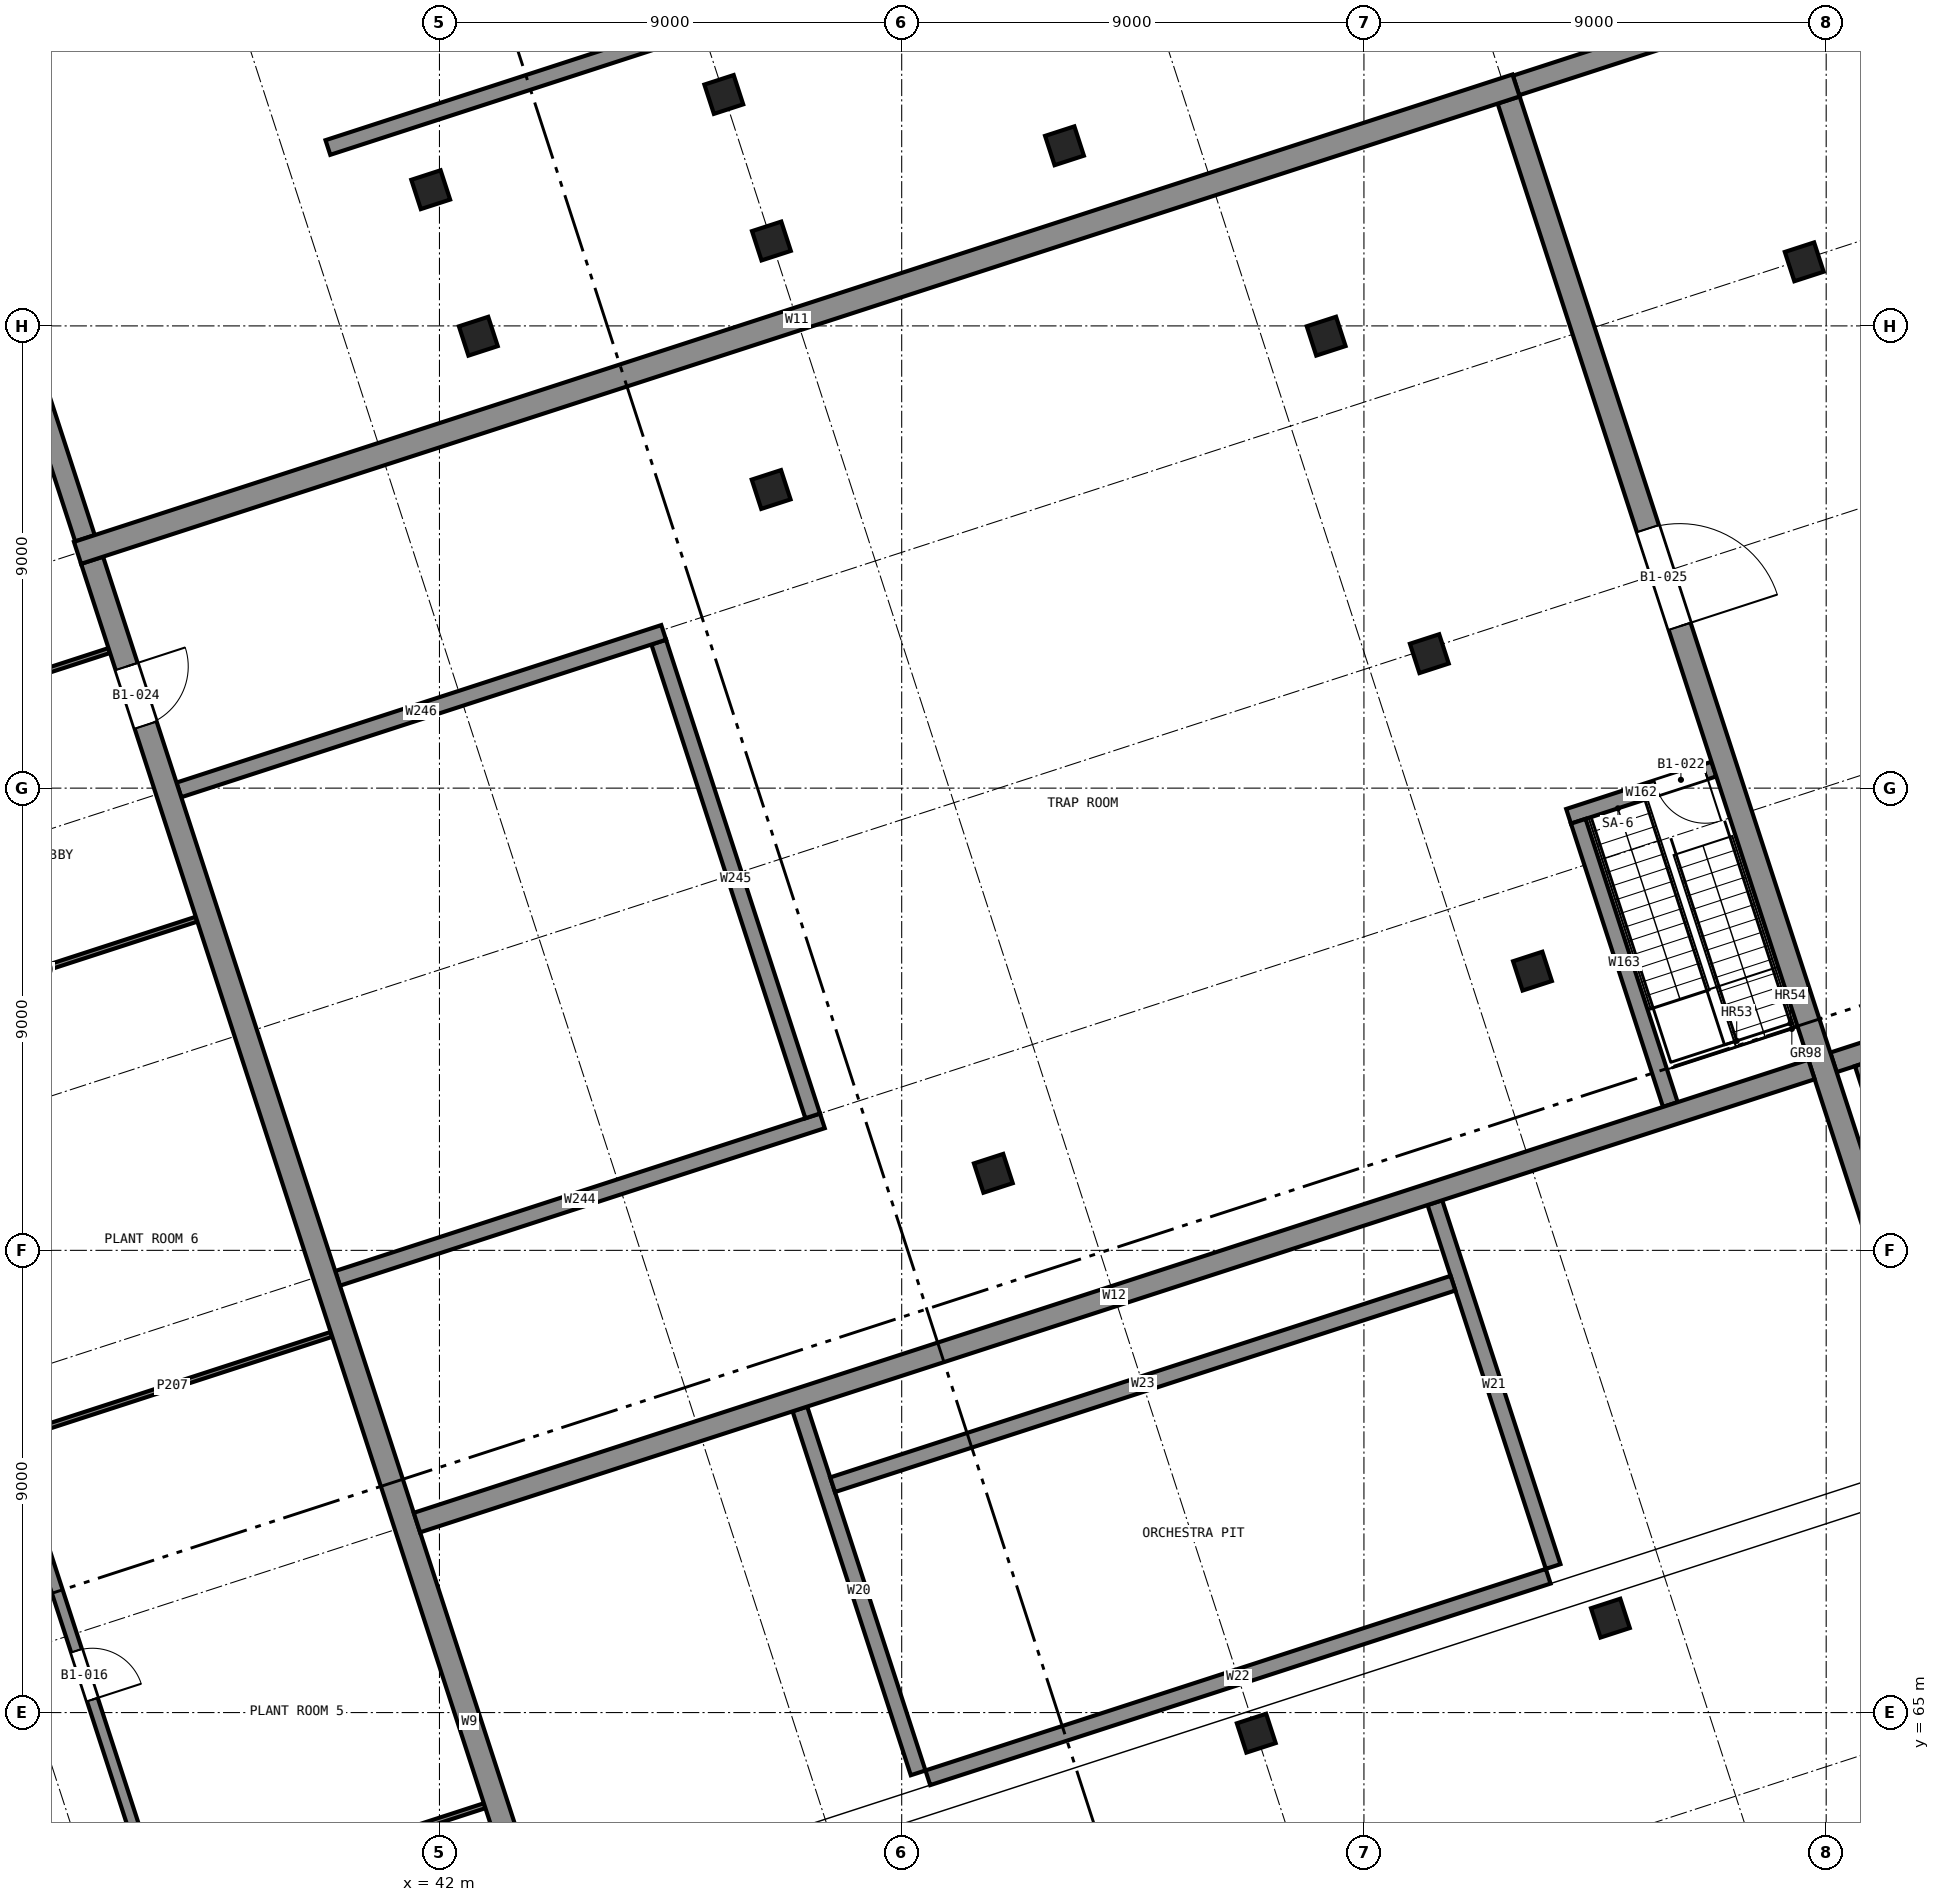
"""IFC4 building model, lengths in metres.
Left out: names, types, materials, properties, quantities, classifications, styles, units other than length and angle.
Written with IfcOpenShell. Run it as: python <this file> out.ifc"""

import sys

from ifc_helpers import new_model, si_unit, direction, frame, frame_2d, origin, origin_2d, place, context, subcontext, project, spatial, rectangle, extrude, element, fill, save


model = new_model("IFC4")
c1 = context("Model", 3, precision=1e-05, world=origin(), true_north=direction((0.0, 1.0)))
c2 = subcontext(c1, "Body", "Model", "MODEL_VIEW")
j1 = project(units=[si_unit("LENGTHUNIT", "METRE"), si_unit("PLANEANGLEUNIT", "RADIAN")], contexts=[c1])
p1 = place(None, origin())
s1 = spatial("IfcSite", under=j1, at=p1, CompositionType="ELEMENT")
p2 = place(p1, origin())
s2 = spatial("IfcBuilding", under=s1, at=p2, CompositionType="ELEMENT")
p3 = place(p2, frame((0.0, 0.0, -5.0)))
s3 = spatial("IfcBuildingStorey", under=s2, at=p3, CompositionType="ELEMENT", Elevation=-5.0)
p4 = place(p3, frame((49.93, 42.214, 0.0), z_axis=(0.0, 0.0, 1.0), x_axis=(-0.309013046462, 0.951057799041, 0.0)))
e1 = element("IfcWall", 1, at=p4, inside=s3, PredefinedType="SHEAR", context=c2, shape_type="SweptSolid", body=[
    extrude(rectangle(XDim=47.55, YDim=0.45, at=frame_2d((23.775, 0.0))), origin(), (0.0, 0.0, 1.0), 5.0),
])
p5 = place(p4, frame((11.775, 0.0, 0.0)))
e2 = element("IfcOpeningElement", 2, at=p5, cuts=e1, PredefinedType="OPENING", context=c2, shape_type="SweptSolid", body=[
    extrude(rectangle(XDim=1.2, YDim=2.1, at=frame_2d((0.6, 1.05))), frame((0.0, 0.235, 0.0), z_axis=(0.0, -1.0, 0.0), x_axis=(1.0, 0.0, 0.0)), (0.0, 0.0, 1.0), 0.47),
])
p6 = place(p4, frame((44.175, 0.0, 0.0)))
e3 = element("IfcOpeningElement", 3, at=p6, cuts=e1, PredefinedType="OPENING", context=c2, shape_type="SweptSolid", body=[
    extrude(rectangle(XDim=1.2, YDim=2.1, at=frame_2d((0.6, 1.05))), frame((0.0, 0.235, 0.0), z_axis=(0.0, -1.0, 0.0), x_axis=(1.0, 0.0, 0.0)), (0.0, 0.0, 1.0), 0.47),
])
p7 = place(p3, frame((77.511, 51.176, 0.0), z_axis=(0.0, 0.0, 1.0), x_axis=(-0.309019199525, 0.951055799796, 0.0)))
e4 = element("IfcWall", 4, at=p7, inside=s3, PredefinedType="SHEAR", context=c2, shape_type="SweptSolid", body=[
    extrude(rectangle(XDim=47.55, YDim=0.45, at=frame_2d((23.775, 0.0))), origin(), (0.0, 0.0, 1.0), 5.0),
])
p8 = place(p7, frame((36.775, 0.0, 0.0)))
e5 = element("IfcOpeningElement", 5, at=p8, cuts=e4, PredefinedType="OPENING", context=c2, shape_type="SweptSolid", body=[
    extrude(rectangle(XDim=2.0, YDim=2.4, at=frame_2d((1.0, 1.2))), frame((0.0, 0.235, 0.0), z_axis=(0.0, -1.0, 0.0), x_axis=(1.0, 0.0, 0.0)), (0.0, 0.0, 1.0), 0.47),
])
p9 = place(p3, frame((34.953, 87.581, 0.0), z_axis=(0.0, 0.0, 1.0), x_axis=(0.951059165148, 0.309008841924, 0.0)))
e6 = element("IfcWall", 6, at=p9, inside=s3, PredefinedType="SHEAR", context=c2, shape_type="SweptSolid", body=[
    extrude(rectangle(XDim=29.45, YDim=0.45, at=frame_2d((14.725, 0.0))), origin(), (0.0, 0.0, 1.0), 5.0),
])
p10 = place(p3, frame((41.562, 68.699, 0.0), z_axis=(0.0, 0.0, 1.0), x_axis=(0.951058008754, 0.309012401021, 0.0)))
e7 = element("IfcWall", 7, at=p10, inside=s3, PredefinedType="SHEAR", context=c2, shape_type="SweptSolid", body=[
    extrude(rectangle(XDim=28.55, YDim=0.4, at=frame_2d((14.275, 0.0))), origin(), (0.0, 0.0, 1.0), 5.0),
])
p11 = place(p3, frame((32.139, 96.971, 0.0), z_axis=(0.0, 0.0, 1.0), x_axis=(0.30901284874, -0.951057863284, 0.0)))
e8 = element("IfcWall", 8, at=p11, inside=s3, PredefinedType="SOLIDWALL", context=c2, shape_type="SweptSolid", body=[
    extrude(rectangle(XDim=9.575, YDim=0.4, at=frame_2d((4.787, 0.0))), origin(), (0.0, 0.0, 1.0), 5.0),
])
p12 = place(p3, frame((69.142, 77.661, 0.0), z_axis=(0.0, 0.0, 1.0), x_axis=(0.951057854068, 0.309012877105, 0.0)))
e9 = element("IfcWall", 9, at=p12, inside=s3, PredefinedType="SOLIDWALL", context=c2, shape_type="SweptSolid", body=[
    extrude(rectangle(XDim=8.975, YDim=0.4, at=frame_2d((4.488, 0.0))), origin(), (0.0, 0.0, 1.0), 5.0),
])
p13 = place(p3, frame((71.498, 99.455, 0.0), z_axis=(0.0, 0.0, 1.0), x_axis=(-0.951055256492, -0.309020871625, 0.0)))
e10 = element("IfcWall", 10, at=p13, inside=s3, PredefinedType="SOLIDWALL", context=c2, shape_type="SweptSolid", body=[
    extrude(rectangle(XDim=8.975, YDim=0.4, at=frame_2d((4.487, 0.0))), origin(), (0.0, 0.0, 1.0), 5.0),
])
p14 = place(p3, frame((51.32, 63.826, 0.0), z_axis=(0.0, 0.0, 1.0), x_axis=(-0.309022346796, 0.951054777171, 0.0)))
e11 = element("IfcWall", 11, at=p14, inside=s3, PredefinedType="SOLIDWALL", context=c2, shape_type="SweptSolid", body=[
    extrude(rectangle(XDim=7.45, YDim=0.3, at=frame_2d((3.725, 0.0))), origin(), (0.0, 0.0, 1.0), 5.0),
])
p15 = place(p3, frame((63.684, 67.843, 0.0), z_axis=(0.0, 0.0, 1.0), x_axis=(-0.308992705592, 0.951064407856, 0.0)))
e12 = element("IfcWall", 12, at=p15, inside=s3, PredefinedType="SOLIDWALL", context=c2, shape_type="SweptSolid", body=[
    extrude(rectangle(XDim=7.45, YDim=0.3, at=frame_2d((3.725, 0.0))), origin(), (0.0, 0.0, 1.0), 5.0),
])
p16 = place(p3, frame((51.509, 63.73, 0.0), z_axis=(0.0, 0.0, 1.0), x_axis=(0.951055115902, 0.30902130431, 0.0)))
e13 = element("IfcWall", 13, at=p16, inside=s3, PredefinedType="SOLIDWALL", context=c2, shape_type="SweptSolid", body=[
    extrude(rectangle(XDim=12.7, YDim=0.3, at=frame_2d((6.35, 0.0))), origin(), (0.0, 0.0, 1.0), 5.0),
])
p17 = place(p3, frame((49.655, 69.436, 0.0), z_axis=(0.0, 0.0, 1.0), x_axis=(0.951062601064, 0.308998266756, 0.0)))
e14 = element("IfcWall", 14, at=p17, inside=s3, PredefinedType="SOLIDWALL", context=c2, shape_type="SweptSolid", body=[
    extrude(rectangle(XDim=12.7, YDim=0.3, at=frame_2d((6.35, 0.0))), origin(), (0.0, 0.0, 1.0), 4.7),
])
p18 = place(p3, frame((66.814, 83.371, 0.0), z_axis=(0.0, 0.0, 1.0), x_axis=(-0.951044320459, -0.30905452678, 0.0)))
e15 = element("IfcWall", 15, at=p18, inside=s3, PredefinedType="SOLIDWALL", context=c2, shape_type="SweptSolid", body=[
    extrude(rectangle(XDim=2.975, YDim=0.3, at=frame_2d((1.488, 0.0))), origin(), (0.0, 0.0, 1.0), 4.6),
])
p19 = place(p18, frame((0.175, 0.0, 0.0)))
e16 = element("IfcOpeningElement", 16, at=p19, cuts=e15, PredefinedType="OPENING", context=c2, shape_type="SweptSolid", body=[
    extrude(rectangle(XDim=1.0, YDim=2.1, at=frame_2d((0.5, 1.05))), frame((0.0, 0.16, 0.0), z_axis=(0.0, -1.0, 0.0), x_axis=(1.0, 0.0, 0.0)), (0.0, 0.0, 1.0), 0.32),
])
p20 = place(p3, frame((64.173, 82.355, 0.0), z_axis=(0.0, 0.0, 1.0), x_axis=(0.309008023519, -0.951059431056, 0.0)))
e17 = element("IfcWall", 17, at=p20, inside=s3, PredefinedType="SOLIDWALL", context=c2, shape_type="SweptSolid", body=[
    extrude(rectangle(XDim=5.8, YDim=0.3, at=frame_2d((2.9, 0.0))), origin(), (0.0, 0.0, 1.0), 4.6),
])
p21 = place(p3, frame((40.016, 73.454, 0.0), z_axis=(0.0, 0.0, 1.0), x_axis=(0.951051963279, 0.309031006768, 0.0)))
e18 = element("IfcWall", 18, at=p21, inside=s3, PredefinedType="SOLIDWALL", context=c2, shape_type="SweptSolid", body=[
    extrude(rectangle(XDim=9.925, YDim=0.3, at=frame_2d((4.962, 0.0))), origin(), (0.0, 0.0, 1.0), 4.6),
])
p22 = place(p3, frame((49.267, 76.618, 0.0), z_axis=(0.0, 0.0, 1.0), x_axis=(-0.309000135, 0.951061994073, 0.0)))
e19 = element("IfcWall", 19, at=p22, inside=s3, PredefinedType="SOLIDWALL", context=c2, shape_type="SweptSolid", body=[
    extrude(rectangle(XDim=9.7, YDim=0.3, at=frame_2d((4.85, 0.0))), origin(), (0.0, 0.0, 1.0), 4.6),
])
p23 = place(p3, frame((46.365, 86.032, 0.0), z_axis=(0.0, 0.0, 1.0), x_axis=(-0.951051963279, -0.309031006768, 0.0)))
e20 = element("IfcWall", 20, at=p23, inside=s3, PredefinedType="SOLIDWALL", context=c2, shape_type="SweptSolid", body=[
    extrude(rectangle(XDim=9.925, YDim=0.3, at=frame_2d((4.962, 0.0))), origin(), (0.0, 0.0, 1.0), 4.6),
])
for number, where, z_axis, x_axis in (
    (21, (61.273, 85.618, 0.0), (0.0, 0.0, 1.0), (0.951, 0.309, 0.0)),
    (22, (63.281, 79.437, 0.0), (0.0, 0.0, 1.0), (0.951, 0.309, 0.0)),
    (23, (59.264, 91.8, 0.0), (0.0, 0.0, 1.0), (0.951, 0.309, 0.0)),
    (24, (52.784, 75.5, 0.0), (0.0, 0.0, 1.0), (0.951, 0.309, 0.0)),
    (25, (48.458, 88.815, 0.0), (0.0, 0.0, 1.0), (0.951, 0.309, 0.0)),
    (26, (68.573, 93.248, 0.0), (0.0, 0.0, 1.0), (0.951, 0.309, 0.0)),
    (27, (42.757, 91.799, 0.0), (0.0, 0.0, 1.0), (0.951, 0.309, 0.0)),
    (28, (48.463, 93.653, 0.0), (0.0, 0.0, 1.0), (0.951, 0.309, 0.0)),
    (29, (54.169, 95.507, 0.0), (0.0, 0.0, 1.0), (0.951, 0.309, 0.0)),
    (30, (41.83, 94.652, 0.0), (0.0, 0.0, 1.0), (0.951, 0.309, 0.0)),
    (31, (47.536, 96.506, 0.0), (0.0, 0.0, 1.0), (0.951, 0.309, 0.0)),
):
    element("IfcColumn", number, at=place(p3, frame(where, z_axis=z_axis, x_axis=x_axis)), inside=s3, PredefinedType="COLUMN", context=c2, shape_type="SweptSolid", body=[
        extrude(rectangle(XDim=0.6, YDim=0.6, at=origin_2d()), origin(), (0.0, 0.0, 1.0), 4.6),
    ])
for number, where, z_axis, x_axis in (
    (32, (57.904, 64.598, 0.0), (0.0, 0.0, 1.0), (0.951, 0.309, 0.0)),
    (33, (64.799, 66.839, 0.0), (0.0, 0.0, 1.0), (0.951, 0.309, 0.0)),
):
    element("IfcColumn", number, at=place(p3, frame(where, z_axis=z_axis, x_axis=x_axis)), inside=s3, PredefinedType="COLUMN", context=c2, shape_type="SweptSolid", body=[
        extrude(rectangle(XDim=0.6, YDim=0.6, at=origin_2d()), origin(), (0.0, 0.0, 1.0), 2.845),
    ])
p24 = place(p3, frame((72.47, 69.279, 0.0), z_axis=(0.0, 0.0, 1.0), x_axis=(-0.309035885645, 0.951050377942, 0.0)))
e34 = element("IfcWall", 34, at=p24, inside=s3, PredefinedType="SHEAR", context=c2, shape_type="SweptSolid", body=[
    extrude(rectangle(XDim=8.8, YDim=0.4, at=frame_2d((4.4, 0.0))), origin(), (0.0, 0.0, 1.0), 4.65),
])
p25 = place(p3, frame((37.956, 48.812, 0.0), z_axis=(0.0, 0.0, 1.0), x_axis=(-0.30901736393, 0.951056396219, 0.0)))
e35 = element("IfcWall", 35, at=p25, inside=s3, PredefinedType="SOLIDWALL", context=c2, shape_type="SweptSolid", body=[
    extrude(rectangle(XDim=41.7, YDim=0.22, at=frame_2d((20.85, 0.0))), origin(), (0.0, 0.0, 1.0), 4.6),
])
p26 = place(p25, frame((2.009, 0.0, 0.0)))
e36 = element("IfcOpeningElement", 36, at=p26, cuts=e35, PredefinedType="OPENING", context=c2, shape_type="SweptSolid", body=[
    extrude(rectangle(XDim=1.0, YDim=2.1, at=frame_2d((0.5, 1.05))), frame((0.0, 0.12, 0.0), z_axis=(0.0, -1.0, 0.0), x_axis=(1.0, 0.0, 0.0)), (0.0, 0.0, 1.0), 0.24),
])
p27 = place(p25, frame((11.495, 0.0, 0.0)))
e37 = element("IfcOpeningElement", 37, at=p27, cuts=e35, PredefinedType="OPENING", context=c2, shape_type="SweptSolid", body=[
    extrude(rectangle(XDim=1.0, YDim=2.1, at=frame_2d((0.5, 1.05))), frame((0.0, 0.12, 0.0), z_axis=(0.0, -1.0, 0.0), x_axis=(1.0, 0.0, 0.0)), (0.0, 0.0, 1.0), 0.24),
])
p28 = place(p25, frame((24.3, 0.0, 0.0)))
e38 = element("IfcOpeningElement", 38, at=p28, cuts=e35, PredefinedType="OPENING", context=c2, shape_type="SweptSolid", body=[
    extrude(rectangle(XDim=1.0, YDim=2.1, at=frame_2d((0.5, 1.05))), frame((0.0, 0.12, 0.0), z_axis=(0.0, -1.0, 0.0), x_axis=(1.0, 0.0, 0.0)), (0.0, 0.0, 1.0), 0.24),
])
p29 = place(p25, frame((35.045, 0.0, 0.0)))
e39 = element("IfcOpeningElement", 39, at=p29, cuts=e35, PredefinedType="OPENING", context=c2, shape_type="SweptSolid", body=[
    extrude(rectangle(XDim=1.0, YDim=2.1, at=frame_2d((0.5, 1.05))), frame((0.0, 0.12, 0.0), z_axis=(0.0, -1.0, 0.0), x_axis=(1.0, 0.0, 0.0)), (0.0, 0.0, 1.0), 0.24),
])
p30 = place(p3, frame((40.333, 49.584, 0.0), z_axis=(0.0, 0.0, 1.0), x_axis=(-0.309015643281, 0.951056955291, 0.0)))
e40 = element("IfcWall", 40, at=p30, inside=s3, PredefinedType="SOLIDWALL", context=c2, shape_type="SweptSolid", body=[
    extrude(rectangle(XDim=41.7, YDim=0.22, at=frame_2d((20.85, 0.0))), origin(), (0.0, 0.0, 1.0), 4.6),
])
p31 = place(p30, frame((2.0, 0.0, 0.0)))
e41 = element("IfcOpeningElement", 41, at=p31, cuts=e40, PredefinedType="OPENING", context=c2, shape_type="SweptSolid", body=[
    extrude(rectangle(XDim=1.0, YDim=2.1, at=frame_2d((0.5, 1.05))), frame((0.0, 0.12, 0.0), z_axis=(0.0, -1.0, 0.0), x_axis=(1.0, 0.0, 0.0)), (0.0, 0.0, 1.0), 0.24),
])
p32 = place(p30, frame((8.285, 0.0, 0.0)))
e42 = element("IfcOpeningElement", 42, at=p32, cuts=e40, PredefinedType="OPENING", context=c2, shape_type="SweptSolid", body=[
    extrude(rectangle(XDim=1.0, YDim=2.1, at=frame_2d((0.5, 1.05))), frame((0.0, 0.12, 0.0), z_axis=(0.0, -1.0, 0.0), x_axis=(1.0, 0.0, 0.0)), (0.0, 0.0, 1.0), 0.24),
])
p33 = place(p30, frame((16.475, 0.0, 0.0)))
e43 = element("IfcOpeningElement", 43, at=p33, cuts=e40, PredefinedType="OPENING", context=c2, shape_type="SweptSolid", body=[
    extrude(rectangle(XDim=1.0, YDim=2.1, at=frame_2d((0.5, 1.05))), frame((0.0, 0.12, 0.0), z_axis=(0.0, -1.0, 0.0), x_axis=(1.0, 0.0, 0.0)), (0.0, 0.0, 1.0), 0.24),
])
p34 = place(p30, frame((25.752, 0.0, 0.0)))
e44 = element("IfcOpeningElement", 44, at=p34, cuts=e40, PredefinedType="OPENING", context=c2, shape_type="SweptSolid", body=[
    extrude(rectangle(XDim=1.0, YDim=2.1, at=frame_2d((0.5, 1.05))), frame((0.0, 0.12, 0.0), z_axis=(0.0, -1.0, 0.0), x_axis=(1.0, 0.0, 0.0)), (0.0, 0.0, 1.0), 0.24),
])
p35 = place(p30, frame((32.761, 0.0, 0.0)))
e45 = element("IfcOpeningElement", 45, at=p35, cuts=e40, PredefinedType="OPENING", context=c2, shape_type="SweptSolid", body=[
    extrude(rectangle(XDim=1.0, YDim=2.1, at=frame_2d((0.5, 1.05))), frame((0.0, 0.12, 0.0), z_axis=(0.0, -1.0, 0.0), x_axis=(1.0, 0.0, 0.0)), (0.0, 0.0, 1.0), 0.24),
])
for number, where, z_axis, x_axis in (
    (46, (36.683, 61.173, 0.0), (0.0, 0.0, 1.0), (0.951, 0.309, 0.0)),
    (47, (33.701, 70.351, 0.0), (0.0, 0.0, 1.0), (0.951, 0.309, 0.0)),
    (48, (31.075, 78.435, 0.0), (0.0, 0.0, 1.0), (0.951, 0.309, 0.0)),
):
    element("IfcWall", number, at=place(p3, frame(where, z_axis=z_axis, x_axis=x_axis)), inside=s3, PredefinedType="PARTITIONING", context=c2, shape_type="SweptSolid", body=[
        extrude(rectangle(XDim=6.515, YDim=0.1, at=frame_2d((3.257, 0.0))), origin(), (0.0, 0.0, 1.0), 4.6),
    ])
p36 = place(p3, frame((29.375, 83.666, 0.0), z_axis=(0.0, 0.0, 1.0), x_axis=(0.951061602966, 0.309001338773, 0.0)))
e49 = element("IfcWall", 49, at=p36, inside=s3, PredefinedType="PARTITIONING", context=c2, shape_type="SweptSolid", body=[
    extrude(rectangle(XDim=6.515, YDim=0.1, at=frame_2d((3.258, 0.0))), origin(), (0.0, 0.0, 1.0), 4.6),
])
p37 = place(p3, frame((39.828, 95.474, 0.0), z_axis=(0.0, 0.0, 1.0), x_axis=(0.951058391285, 0.309011223689, 0.0)))
e50 = element("IfcWall", 50, at=p37, inside=s3, PredefinedType="SOLIDWALL", context=c2, shape_type="SweptSolid", body=[
    extrude(rectangle(XDim=16.3, YDim=0.3, at=frame_2d((8.15, 0.0))), origin(), (0.0, 0.0, 1.0), 5.0),
])
p38 = place(p33, frame((1.0, 0.0, 0.0), z_axis=(0.0, 0.0, 1.0), x_axis=(-1.0, 0.0, 0.0)))
e51 = element("IfcDoor", 51, at=p38, inside=s3, OperationType="SINGLE_SWING_LEFT", PredefinedType="DOOR", context=c2, shape_type="SweptSolid", body=[
    extrude(rectangle(XDim=1.0, YDim=2.1, at=frame_2d((0.5, 1.05))), frame((0.0, 0.025, 0.0), z_axis=(0.0, -1.0, 0.0), x_axis=(1.0, 0.0, 0.0)), (0.0, 0.0, 1.0), 0.05),
])
fill(e43, e51)
p39 = place(p19, origin())
e52 = element("IfcDoor", 52, at=p39, inside=s3, OperationType="SINGLE_SWING_RIGHT", PredefinedType="DOOR", context=c2, shape_type="SweptSolid", body=[
    extrude(rectangle(XDim=1.0, YDim=2.1, at=frame_2d((0.5, 1.05))), frame((0.0, 0.025, 0.0), z_axis=(0.0, -1.0, 0.0), x_axis=(1.0, 0.0, 0.0)), (0.0, 0.0, 1.0), 0.05),
])
fill(e16, e52)
p40 = place(p6, frame((1.2, 0.0, 0.0), z_axis=(0.0, 0.0, 1.0), x_axis=(-1.0, 0.0, 0.0)))
e53 = element("IfcDoor", 53, at=p40, inside=s3, OperationType="SINGLE_SWING_RIGHT", PredefinedType="DOOR", context=c2, shape_type="SweptSolid", body=[
    extrude(rectangle(XDim=1.2, YDim=2.1, at=frame_2d((0.6, 1.05))), frame((0.0, 0.025, 0.0), z_axis=(0.0, -1.0, 0.0), x_axis=(1.0, 0.0, 0.0)), (0.0, 0.0, 1.0), 0.05),
])
fill(e3, e53)
p41 = place(p8, frame((2.0, 0.0, 0.0), z_axis=(0.0, 0.0, 1.0), x_axis=(-1.0, 0.0, 0.0)))
e54 = element("IfcDoor", 54, at=p41, inside=s3, OperationType="DOUBLE_DOOR_SINGLE_SWING", PredefinedType="DOOR", context=c2, shape_type="SweptSolid", body=[
    extrude(rectangle(XDim=2.0, YDim=2.4, at=frame_2d((1.0, 1.2))), frame((0.0, 0.025, 0.0), z_axis=(0.0, -1.0, 0.0), x_axis=(1.0, 0.0, 0.0)), (0.0, 0.0, 1.0), 0.05),
])
fill(e5, e54)
save(model, sys.argv[1])
